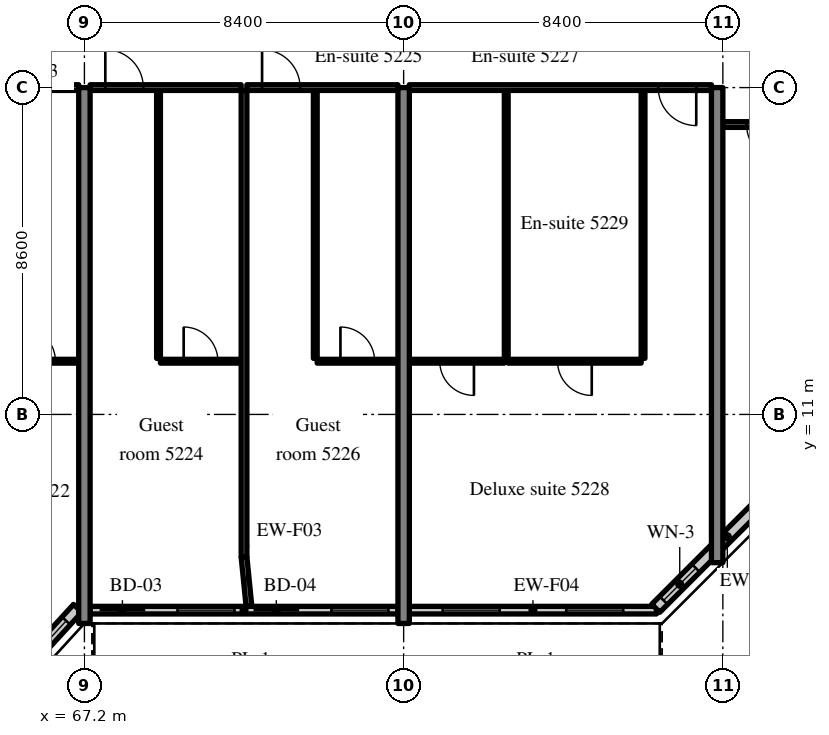
"""IFC4 building model, lengths in metres.
Left out: names, types, materials, properties, quantities, classifications, styles, units other than length and angle.
Written with IfcOpenShell. Run it as: python <this file> out.ifc"""

import sys

from ifc_helpers import new_model, si_unit, direction, frame, frame_2d, origin, place, context, subcontext, project, spatial, rectangle, extrude, source, transform, mapped, element, fill, save


model = new_model("IFC4")
c1 = context("Model", 3, precision=1e-05, world=origin(), true_north=direction((0.0, 1.0)))
c2 = subcontext(c1, "Body", "Model", "MODEL_VIEW")
j1 = project(units=[si_unit("LENGTHUNIT", "METRE"), si_unit("PLANEANGLEUNIT", "RADIAN")], contexts=[c1])
p1 = place(None, origin())
s1 = spatial("IfcSite", under=j1, at=p1, CompositionType="ELEMENT")
p2 = place(p1, origin())
s2 = spatial("IfcBuilding", under=s1, at=p2, CompositionType="ELEMENT")
p3 = place(p2, frame((0.0, 0.0, 217.9)))
s3 = spatial("IfcBuildingStorey", under=s2, at=p3, CompositionType="ELEMENT", Elevation=217.9)
m1 = source(origin(), c2, "Body", "SweptSolid", [
    extrude(rectangle(XDim=14.1, YDim=0.3, at=frame_2d((7.05, 0.0))), origin(), (0.0, 0.0, 1.0), 3.62),
])
for number, where, z_axis, x_axis in (
    (1, (67.2, 5.5, 0.0), (0.0, 0.0, 1.0), (0.0, 1.0, 0.0)),
    (2, (75.6, 5.5, 0.0), (0.0, 0.0, 1.0), (0.0, 1.0, 0.0)),
):
    element("IfcWall", number, at=place(p3, frame(where, z_axis=z_axis, x_axis=x_axis)), inside=s3, PredefinedType="SHEAR", context=c2, shape_type="MappedRepresentation", body=[
        mapped(m1, transform((0.0, 0.0, 0.0), scale=1.0)),
    ])
m2 = source(origin(), c2, "Body", "SweptSolid", [
    extrude(rectangle(XDim=12.5, YDim=0.3, at=frame_2d((6.25, 0.0))), origin(), (0.0, 0.0, 1.0), 3.62),
])
p4 = place(p3, frame((83.85, 7.1, 0.0), z_axis=(0.0, 0.0, 1.0), x_axis=(0.0, 1.0, 0.0)))
e3 = element("IfcWall", 3, at=p4, inside=s3, PredefinedType="SHEAR", context=c2, shape_type="MappedRepresentation", body=[
    mapped(m2, transform((0.0, 0.0, 0.0), scale=1.0)),
])
m3 = source(origin(), c2, "Body", "SweptSolid", [
    extrude(rectangle(XDim=2.398, YDim=0.3, at=frame_2d((1.199, 0.0))), origin(), (0.0, 0.0, 1.0), 3.62),
])
p5 = place(p3, frame((65.404, 4.131, 0.0), z_axis=(0.0, 0.0, 1.0), x_axis=(0.675374189419, 0.737475222815, 0.0)))
e4 = element("IfcWall", 4, at=p5, inside=s3, PredefinedType="SOLIDWALL", context=c2, shape_type="MappedRepresentation", body=[
    mapped(m3, transform((0.0, 0.0, 0.0), scale=1.0)),
])
m4 = source(origin(), c2, "Body", "SweptSolid", [
    extrude(rectangle(XDim=1.5, YDim=2.0, at=frame_2d((0.75, 1.0))), frame((0.0, 0.16, 0.0), z_axis=(0.0, -1.0, 0.0), x_axis=(1.0, 0.0, 0.0)), (0.0, 0.0, 1.0), 0.32),
])
p6 = place(p5, frame((0.449, 0.0, 0.9)))
e5 = element("IfcOpeningElement", 5, at=p6, cuts=e4, PredefinedType="OPENING", context=c2, shape_type="MappedRepresentation", body=[
    mapped(m4, transform((0.0, 0.0, 0.0), scale=1.0)),
])
m5 = source(origin(), c2, "Body", "SweptSolid", [
    extrude(rectangle(XDim=8.1, YDim=0.2, at=frame_2d((4.05, 0.0))), origin(), (0.0, 0.0, 1.0), 3.02),
])
p7 = place(p3, frame((67.35, 5.85, 0.0), z_axis=(0.0, 0.0, 1.0), x_axis=(1.0, 0.0, 0.0)))
e6 = element("IfcWall", 6, at=p7, inside=s3, PredefinedType="SOLIDWALL", context=c2, shape_type="MappedRepresentation", body=[
    mapped(m5, transform((0.0, 0.0, 0.0), scale=1.0)),
])
m6 = source(origin(), c2, "Body", "SweptSolid", [
    extrude(rectangle(XDim=1.2, YDim=2.4, at=frame_2d((0.6, 1.2))), frame((0.0, 0.11, 0.0), z_axis=(0.0, -1.0, 0.0), x_axis=(1.0, 0.0, 0.0)), (0.0, 0.0, 1.0), 0.22),
])
p8 = place(p7, frame((0.25, 0.0, 0.0)))
e7 = element("IfcOpeningElement", 7, at=p8, cuts=e6, PredefinedType="OPENING", context=c2, shape_type="MappedRepresentation", body=[
    mapped(m6, transform((0.0, 0.0, 0.0), scale=1.0)),
])
m7 = source(origin(), c2, "Body", "SweptSolid", [
    extrude(rectangle(XDim=1.5, YDim=1.5, at=frame_2d((0.75, 0.75))), frame((0.0, 0.11, 0.0), z_axis=(0.0, -1.0, 0.0), x_axis=(1.0, 0.0, 0.0)), (0.0, 0.0, 1.0), 0.22),
])
p9 = place(p7, frame((2.3, 0.0, 0.9)))
e8 = element("IfcOpeningElement", 8, at=p9, cuts=e6, PredefinedType="OPENING", context=c2, shape_type="MappedRepresentation", body=[
    mapped(m7, transform((0.0, 0.0, 0.0), scale=1.0)),
])
p10 = place(p7, frame((4.3, 0.0, 0.0)))
e9 = element("IfcOpeningElement", 9, at=p10, cuts=e6, PredefinedType="OPENING", context=c2, shape_type="MappedRepresentation", body=[
    mapped(m6, transform((0.0, 0.0, 0.0), scale=1.0)),
])
p11 = place(p7, frame((6.35, 0.0, 0.9)))
e10 = element("IfcOpeningElement", 10, at=p11, cuts=e6, PredefinedType="OPENING", context=c2, shape_type="MappedRepresentation", body=[
    mapped(m7, transform((0.0, 0.0, 0.0), scale=1.0)),
])
m8 = source(origin(), c2, "Body", "SweptSolid", [
    extrude(rectangle(XDim=6.505, YDim=0.2, at=frame_2d((3.252, 0.0))), origin(), (0.0, 0.0, 1.0), 3.02),
])
p12 = place(p3, frame((75.75, 5.85, 0.0), z_axis=(0.0, 0.0, 1.0), x_axis=(1.0, 0.0, 0.0)))
e11 = element("IfcWall", 11, at=p12, inside=s3, PredefinedType="SOLIDWALL", context=c2, shape_type="MappedRepresentation", body=[
    mapped(m8, transform((0.0, 0.0, 0.0), scale=1.0)),
])
p13 = place(p12, frame((0.876, 0.0, 0.9)))
e12 = element("IfcOpeningElement", 12, at=p13, cuts=e11, PredefinedType="OPENING", context=c2, shape_type="MappedRepresentation", body=[
    mapped(m7, transform((0.0, 0.0, 0.0), scale=1.0)),
])
p14 = place(p12, frame((4.129, 0.0, 0.9)))
e13 = element("IfcOpeningElement", 13, at=p14, cuts=e11, PredefinedType="OPENING", context=c2, shape_type="MappedRepresentation", body=[
    mapped(m7, transform((0.0, 0.0, 0.0), scale=1.0)),
])
m9 = source(origin(), c2, "Body", "SweptSolid", [
    extrude(rectangle(XDim=5.326, YDim=0.3, at=frame_2d((2.663, 0.0))), origin(), (0.0, 0.0, 1.0), 3.62),
])
p15 = place(p3, frame((82.234, 5.9, 0.0), z_axis=(0.0, 0.0, 1.0), x_axis=(0.707083859269, 0.707129702361, 0.0)))
e14 = element("IfcWall", 14, at=p15, inside=s3, PredefinedType="SOLIDWALL", context=c2, shape_type="MappedRepresentation", body=[
    mapped(m9, transform((0.0, 0.0, 0.0), scale=1.0)),
])
m10 = source(origin(), c2, "Body", "SweptSolid", [
    extrude(rectangle(XDim=1.2, YDim=1.5, at=frame_2d((0.6, 0.75))), frame((0.0, 0.16, 0.0), z_axis=(0.0, -1.0, 0.0), x_axis=(1.0, 0.0, 0.0)), (0.0, 0.0, 1.0), 0.32),
])
p16 = place(p15, frame((0.292, 0.0, 0.9)))
e15 = element("IfcOpeningElement", 15, at=p16, cuts=e14, PredefinedType="OPENING", context=c2, shape_type="MappedRepresentation", body=[
    mapped(m10, transform((0.0, 0.0, 0.0), scale=1.0)),
])
m11 = source(origin(), c2, "Body", "SweptSolid", [
    extrude(rectangle(XDim=2.125, YDim=0.1, at=frame_2d((1.062, 0.0))), origin(), (0.0, 0.0, 1.0), 3.62),
])
p17 = place(p3, frame((64.925, 12.4, 0.0), z_axis=(0.0, 0.0, 1.0), x_axis=(1.0, 0.0, 0.0)))
e16 = element("IfcWall", 16, at=p17, inside=s3, PredefinedType="PARTITIONING", context=c2, shape_type="MappedRepresentation", body=[
    mapped(m11, transform((0.0, 0.0, 0.0), scale=1.0)),
])
m12 = source(origin(), c2, "Body", "SweptSolid", [
    extrude(rectangle(XDim=0.9, YDim=2.1, at=frame_2d((0.45, 1.05))), frame((0.0, 0.06, 0.0), z_axis=(0.0, -1.0, 0.0), x_axis=(1.0, 0.0, 0.0)), (0.0, 0.0, 1.0), 0.12),
])
p18 = place(p17, frame((0.612, 0.0, 0.0)))
e17 = element("IfcOpeningElement", 17, at=p18, cuts=e16, PredefinedType="OPENING", context=c2, shape_type="MappedRepresentation", body=[
    mapped(m12, transform((0.0, 0.0, 0.0), scale=1.0)),
])
m13 = source(origin(), c2, "Body", "SweptSolid", [
    extrude(rectangle(XDim=3.975, YDim=0.15, at=frame_2d((1.988, 0.0))), origin(), (0.0, 0.0, 1.0), 2.92),
])
p19 = place(p3, frame((63.075, 19.6, 0.0), z_axis=(0.0, 0.0, 1.0), x_axis=(1.0, 0.0, 0.0)))
e18 = element("IfcWall", 18, at=p19, inside=s3, PredefinedType="PARTITIONING", context=c2, shape_type="MappedRepresentation", body=[
    mapped(m13, transform((0.0, 0.0, 0.0), scale=1.0)),
])
m14 = source(origin(), c2, "Body", "SweptSolid", [
    extrude(rectangle(XDim=1.0, YDim=2.1, at=frame_2d((0.5, 1.05))), frame((0.0, 0.085, 0.0), z_axis=(0.0, -1.0, 0.0), x_axis=(1.0, 0.0, 0.0)), (0.0, 0.0, 1.0), 0.17),
])
p20 = place(p19, frame((0.4, 0.0, 0.0)))
e19 = element("IfcOpeningElement", 19, at=p20, cuts=e18, PredefinedType="OPENING", context=c2, shape_type="MappedRepresentation", body=[
    mapped(m14, transform((0.0, 0.0, 0.0), scale=1.0)),
])
m15 = source(origin(), c2, "Body", "SweptSolid", [
    extrude(rectangle(XDim=7.05, YDim=0.1, at=frame_2d((3.525, 0.0))), origin(), (0.0, 0.0, 1.0), 3.62),
])
p21 = place(p3, frame((69.15, 12.475, 0.0), z_axis=(0.0, 0.0, 1.0), x_axis=(0.0, 1.0, 0.0)))
e20 = element("IfcWall", 20, at=p21, inside=s3, PredefinedType="PARTITIONING", context=c2, shape_type="MappedRepresentation", body=[
    mapped(m15, transform((0.0, 0.0, 0.0), scale=1.0)),
])
p22 = place(p3, frame((69.2, 12.4, 0.0), z_axis=(0.0, 0.0, 1.0), x_axis=(1.0, 0.0, 0.0)))
e21 = element("IfcWall", 21, at=p22, inside=s3, PredefinedType="PARTITIONING", context=c2, shape_type="MappedRepresentation", body=[
    mapped(m11, transform((0.0, 0.0, 0.0), scale=1.0)),
])
p23 = place(p22, frame((0.612, 0.0, 0.0)))
e22 = element("IfcOpeningElement", 22, at=p23, cuts=e21, PredefinedType="OPENING", context=c2, shape_type="MappedRepresentation", body=[
    mapped(m12, transform((0.0, 0.0, 0.0), scale=1.0)),
])
m16 = source(origin(), c2, "Body", "SweptSolid", [
    extrude(rectangle(XDim=3.975, YDim=0.15, at=frame_2d((1.987, 0.0))), origin(), (0.0, 0.0, 1.0), 2.92),
])
p24 = place(p3, frame((67.35, 19.6, 0.0), z_axis=(0.0, 0.0, 1.0), x_axis=(1.0, 0.0, 0.0)))
e23 = element("IfcWall", 23, at=p24, inside=s3, PredefinedType="PARTITIONING", context=c2, shape_type="MappedRepresentation", body=[
    mapped(m16, transform((0.0, 0.0, 0.0), scale=1.0)),
])
p25 = place(p24, frame((0.4, 0.0, 0.0)))
e24 = element("IfcOpeningElement", 24, at=p25, cuts=e23, PredefinedType="OPENING", context=c2, shape_type="MappedRepresentation", body=[
    mapped(m14, transform((0.0, 0.0, 0.0), scale=1.0)),
])
p26 = place(p3, frame((73.275, 12.475, 0.0), z_axis=(0.0, 0.0, 1.0), x_axis=(0.0, 1.0, 0.0)))
e25 = element("IfcWall", 25, at=p26, inside=s3, PredefinedType="PARTITIONING", context=c2, shape_type="MappedRepresentation", body=[
    mapped(m15, transform((0.0, 0.0, 0.0), scale=1.0)),
])
p27 = place(p3, frame((73.325, 12.4, 0.0), z_axis=(0.0, 0.0, 1.0), x_axis=(1.0, 0.0, 0.0)))
e26 = element("IfcWall", 26, at=p27, inside=s3, PredefinedType="PARTITIONING", context=c2, shape_type="MappedRepresentation", body=[
    mapped(m11, transform((0.0, 0.0, 0.0), scale=1.0)),
])
p28 = place(p27, frame((0.612, 0.0, 0.0)))
e27 = element("IfcOpeningElement", 27, at=p28, cuts=e26, PredefinedType="OPENING", context=c2, shape_type="MappedRepresentation", body=[
    mapped(m12, transform((0.0, 0.0, 0.0), scale=1.0)),
])
p29 = place(p3, frame((71.475, 19.6, 0.0), z_axis=(0.0, 0.0, 1.0), x_axis=(1.0, 0.0, 0.0)))
e28 = element("IfcWall", 28, at=p29, inside=s3, PredefinedType="PARTITIONING", context=c2, shape_type="MappedRepresentation", body=[
    mapped(m16, transform((0.0, 0.0, 0.0), scale=1.0)),
])
p30 = place(p29, frame((0.4, 0.0, 0.0)))
e29 = element("IfcOpeningElement", 29, at=p30, cuts=e28, PredefinedType="OPENING", context=c2, shape_type="MappedRepresentation", body=[
    mapped(m14, transform((0.0, 0.0, 0.0), scale=1.0)),
])
m17 = source(origin(), c2, "Body", "SweptSolid", [
    extrude(rectangle(XDim=12.275, YDim=0.15, at=frame_2d((6.137, 0.0))), origin(), (0.0, 0.0, 1.0), 3.62),
])
p31 = place(p3, frame((71.4, 7.25, 0.0), z_axis=(0.0, 0.0, 1.0), x_axis=(0.0, 1.0, 0.0)))
e30 = element("IfcWall", 30, at=p31, inside=s3, PredefinedType="PARTITIONING", context=c2, shape_type="MappedRepresentation", body=[
    mapped(m17, transform((0.0, 0.0, 0.0), scale=1.0)),
])
for number, where, z_axis, x_axis in (
    (31, (81.9, 12.475, 0.0), (0.0, 0.0, 1.0), (0.0, 1.0, 0.0)),
    (32, (78.3, 12.475, 0.0), (0.0, 0.0, 1.0), (0.0, 1.0, 0.0)),
):
    element("IfcWall", number, at=place(p3, frame(where, z_axis=z_axis, x_axis=x_axis)), inside=s3, PredefinedType="PARTITIONING", context=c2, shape_type="MappedRepresentation", body=[
        mapped(m15, transform((0.0, 0.0, 0.0), scale=1.0)),
    ])
m18 = source(origin(), c2, "Body", "SweptSolid", [
    extrude(rectangle(XDim=3.5, YDim=0.1, at=frame_2d((1.75, 0.0))), origin(), (0.0, 0.0, 1.0), 3.62),
])
p32 = place(p3, frame((78.35, 12.4, 0.0), z_axis=(0.0, 0.0, 1.0), x_axis=(1.0, 0.0, 0.0)))
e33 = element("IfcWall", 33, at=p32, inside=s3, PredefinedType="PARTITIONING", context=c2, shape_type="MappedRepresentation", body=[
    mapped(m18, transform((0.0, 0.0, 0.0), scale=1.0)),
])
p33 = place(p32, frame((1.3, 0.0, 0.0)))
e34 = element("IfcOpeningElement", 34, at=p33, cuts=e33, PredefinedType="OPENING", context=c2, shape_type="MappedRepresentation", body=[
    mapped(m12, transform((0.0, 0.0, 0.0), scale=1.0)),
])
m19 = source(origin(), c2, "Body", "SweptSolid", [
    extrude(rectangle(XDim=2.5, YDim=0.1, at=frame_2d((1.25, 0.0))), origin(), (0.0, 0.0, 1.0), 3.62),
])
p34 = place(p3, frame((75.75, 12.4, 0.0), z_axis=(0.0, 0.0, 1.0), x_axis=(1.0, 0.0, 0.0)))
e35 = element("IfcWall", 35, at=p34, inside=s3, PredefinedType="PARTITIONING", context=c2, shape_type="MappedRepresentation", body=[
    mapped(m19, transform((0.0, 0.0, 0.0), scale=1.0)),
])
p35 = place(p34, frame((0.8, 0.0, 0.0)))
e36 = element("IfcOpeningElement", 36, at=p35, cuts=e35, PredefinedType="OPENING", context=c2, shape_type="MappedRepresentation", body=[
    mapped(m12, transform((0.0, 0.0, 0.0), scale=1.0)),
])
m20 = source(origin(), c2, "Body", "SweptSolid", [
    extrude(rectangle(XDim=7.95, YDim=0.15, at=frame_2d((3.975, 0.0))), origin(), (0.0, 0.0, 1.0), 2.92),
])
p36 = place(p3, frame((75.75, 19.6, 0.0), z_axis=(0.0, 0.0, 1.0), x_axis=(1.0, 0.0, 0.0)))
e37 = element("IfcWall", 37, at=p36, inside=s3, PredefinedType="PARTITIONING", context=c2, shape_type="MappedRepresentation", body=[
    mapped(m20, transform((0.0, 0.0, 0.0), scale=1.0)),
])
p37 = place(p36, frame((6.55, 0.0, 0.0)))
e38 = element("IfcOpeningElement", 38, at=p37, cuts=e37, PredefinedType="OPENING", context=c2, shape_type="MappedRepresentation", body=[
    mapped(m14, transform((0.0, 0.0, 0.0), scale=1.0)),
])
m21 = source(origin(), c2, "Body", "SweptSolid", [
    extrude(rectangle(XDim=1.9, YDim=0.15, at=frame_2d((0.95, 0.0))), origin(), (0.0, 0.0, 1.0), 2.92),
])
p38 = place(p3, frame((84.0, 18.628, 0.0), z_axis=(0.0, 0.0, 1.0), x_axis=(1.0, 0.0, 0.0)))
e39 = element("IfcWall", 39, at=p38, inside=s3, PredefinedType="PARTITIONING", context=c2, shape_type="MappedRepresentation", body=[
    mapped(m21, transform((0.0, 0.0, 0.0), scale=1.0)),
])
p39 = place(p38, frame((0.625, 0.0, 0.0)))
e40 = element("IfcOpeningElement", 40, at=p39, cuts=e39, PredefinedType="OPENING", context=c2, shape_type="MappedRepresentation", body=[
    mapped(m14, transform((0.0, 0.0, 0.0), scale=1.0)),
])
m22 = source(origin(), c2, "Body", "SweptSolid", [
    extrude(rectangle(XDim=1.307, YDim=0.15, at=frame_2d((0.653, 0.0))), origin(), (0.0, 0.0, 1.0), 3.62),
])
p40 = place(p3, frame((71.53, 5.95, 0.0), z_axis=(0.0, 0.0, 1.0), x_axis=(-0.099596223396, 0.99502793543, 0.0)))
e41 = element("IfcWall", 41, at=p40, inside=s3, PredefinedType="PARTITIONING", context=c2, shape_type="MappedRepresentation", body=[
    mapped(m22, transform((0.0, 0.0, 0.0), scale=1.0)),
])
m23 = source(origin(), c2, "Body", "SweptSolid", [
    extrude(rectangle(XDim=1.5, YDim=2.0, at=frame_2d((0.75, 1.0))), frame((0.0, 0.03, 0.0), z_axis=(0.0, -1.0, 0.0), x_axis=(1.0, 0.0, 0.0)), (0.0, 0.0, 1.0), 0.06),
])
p41 = place(p6, origin())
e42 = element("IfcWindow", 42, at=p41, inside=s3, PartitioningType="SINGLE_PANEL", PredefinedType="WINDOW", context=c2, shape_type="MappedRepresentation", body=[
    mapped(m23, transform((0.0, 0.0, 0.0), scale=1.0)),
])
fill(e5, e42)
m24 = source(origin(), c2, "Body", "SweptSolid", [
    extrude(rectangle(XDim=1.2, YDim=2.4, at=frame_2d((0.6, 1.2))), frame((0.0, 0.025, 0.0), z_axis=(0.0, -1.0, 0.0), x_axis=(1.0, 0.0, 0.0)), (0.0, 0.0, 1.0), 0.05),
])
p42 = place(p8, origin())
e43 = element("IfcDoor", 43, at=p42, inside=s3, OperationType="SLIDING_TO_LEFT", PredefinedType="DOOR", context=c2, shape_type="MappedRepresentation", body=[
    mapped(m24, transform((0.0, 0.0, 0.0), scale=1.0)),
])
fill(e7, e43)
m25 = source(origin(), c2, "Body", "SweptSolid", [
    extrude(rectangle(XDim=1.5, YDim=1.5, at=frame_2d((0.75, 0.75))), frame((0.0, 0.03, 0.0), z_axis=(0.0, -1.0, 0.0), x_axis=(1.0, 0.0, 0.0)), (0.0, 0.0, 1.0), 0.06),
])
p43 = place(p9, origin())
e44 = element("IfcWindow", 44, at=p43, inside=s3, PartitioningType="SINGLE_PANEL", PredefinedType="WINDOW", context=c2, shape_type="MappedRepresentation", body=[
    mapped(m25, transform((0.0, 0.0, 0.0), scale=1.0)),
])
fill(e8, e44)
p44 = place(p10, origin())
e45 = element("IfcDoor", 45, at=p44, inside=s3, OperationType="SLIDING_TO_RIGHT", PredefinedType="DOOR", context=c2, shape_type="MappedRepresentation", body=[
    mapped(m24, transform((0.0, 0.0, 0.0), scale=1.0)),
])
fill(e9, e45)
p45 = place(p11, origin())
e46 = element("IfcWindow", 46, at=p45, inside=s3, PartitioningType="SINGLE_PANEL", PredefinedType="WINDOW", context=c2, shape_type="MappedRepresentation", body=[
    mapped(m25, transform((0.0, 0.0, 0.0), scale=1.0)),
])
fill(e10, e46)
p46 = place(p13, origin())
e47 = element("IfcWindow", 47, at=p46, inside=s3, PartitioningType="SINGLE_PANEL", PredefinedType="WINDOW", context=c2, shape_type="MappedRepresentation", body=[
    mapped(m25, transform((0.0, 0.0, 0.0), scale=1.0)),
])
fill(e12, e47)
p47 = place(p14, origin())
e48 = element("IfcWindow", 48, at=p47, inside=s3, PartitioningType="SINGLE_PANEL", PredefinedType="WINDOW", context=c2, shape_type="MappedRepresentation", body=[
    mapped(m25, transform((0.0, 0.0, 0.0), scale=1.0)),
])
fill(e13, e48)
m26 = source(origin(), c2, "Body", "SweptSolid", [
    extrude(rectangle(XDim=1.2, YDim=1.5, at=frame_2d((0.6, 0.75))), frame((0.0, 0.03, 0.0), z_axis=(0.0, -1.0, 0.0), x_axis=(1.0, 0.0, 0.0)), (0.0, 0.0, 1.0), 0.06),
])
p48 = place(p16, origin())
e49 = element("IfcWindow", 49, at=p48, inside=s3, PartitioningType="SINGLE_PANEL", PredefinedType="WINDOW", context=c2, shape_type="MappedRepresentation", body=[
    mapped(m26, transform((0.0, 0.0, 0.0), scale=1.0)),
])
fill(e15, e49)
m27 = source(origin(), c2, "Body", "SweptSolid", [
    extrude(rectangle(XDim=0.9, YDim=2.1, at=frame_2d((0.45, 1.05))), frame((0.0, 0.025, 0.0), z_axis=(0.0, -1.0, 0.0), x_axis=(1.0, 0.0, 0.0)), (0.0, 0.0, 1.0), 0.05),
])
p49 = place(p18, origin())
e50 = element("IfcDoor", 50, at=p49, inside=s3, OperationType="SINGLE_SWING_LEFT", PredefinedType="DOOR", context=c2, shape_type="MappedRepresentation", body=[
    mapped(m27, transform((0.0, 0.0, 0.0), scale=1.0)),
])
fill(e17, e50)
p50 = place(p23, origin())
e51 = element("IfcDoor", 51, at=p50, inside=s3, OperationType="SINGLE_SWING_LEFT", PredefinedType="DOOR", context=c2, shape_type="MappedRepresentation", body=[
    mapped(m27, transform((0.0, 0.0, 0.0), scale=1.0)),
])
fill(e22, e51)
m28 = source(origin(), c2, "Body", "SweptSolid", [
    extrude(rectangle(XDim=1.0, YDim=2.1, at=frame_2d((0.5, 1.05))), frame((0.0, 0.025, 0.0), z_axis=(0.0, -1.0, 0.0), x_axis=(1.0, 0.0, 0.0)), (0.0, 0.0, 1.0), 0.05),
])
p51 = place(p25, origin())
e52 = element("IfcDoor", 52, at=p51, inside=s3, OperationType="SINGLE_SWING_LEFT", PredefinedType="DOOR", context=c2, shape_type="MappedRepresentation", body=[
    mapped(m28, transform((0.0, 0.0, 0.0), scale=1.0)),
])
fill(e24, e52)
p52 = place(p28, origin())
e53 = element("IfcDoor", 53, at=p52, inside=s3, OperationType="SINGLE_SWING_LEFT", PredefinedType="DOOR", context=c2, shape_type="MappedRepresentation", body=[
    mapped(m27, transform((0.0, 0.0, 0.0), scale=1.0)),
])
fill(e27, e53)
p53 = place(p30, origin())
e54 = element("IfcDoor", 54, at=p53, inside=s3, OperationType="SINGLE_SWING_LEFT", PredefinedType="DOOR", context=c2, shape_type="MappedRepresentation", body=[
    mapped(m28, transform((0.0, 0.0, 0.0), scale=1.0)),
])
fill(e29, e54)
p54 = place(p33, origin())
e55 = element("IfcDoor", 55, at=p54, inside=s3, OperationType="SINGLE_SWING_RIGHT", PredefinedType="DOOR", context=c2, shape_type="MappedRepresentation", body=[
    mapped(m27, transform((0.0, 0.0, 0.0), scale=1.0)),
])
fill(e34, e55)
p55 = place(p35, origin())
e56 = element("IfcDoor", 56, at=p55, inside=s3, OperationType="SINGLE_SWING_RIGHT", PredefinedType="DOOR", context=c2, shape_type="MappedRepresentation", body=[
    mapped(m27, transform((0.0, 0.0, 0.0), scale=1.0)),
])
fill(e36, e56)
p56 = place(p37, origin())
e57 = element("IfcDoor", 57, at=p56, inside=s3, OperationType="SINGLE_SWING_RIGHT", PredefinedType="DOOR", context=c2, shape_type="MappedRepresentation", body=[
    mapped(m28, transform((0.0, 0.0, 0.0), scale=1.0)),
])
fill(e38, e57)
p57 = place(p39, origin())
e58 = element("IfcDoor", 58, at=p57, inside=s3, OperationType="SINGLE_SWING_RIGHT", PredefinedType="DOOR", context=c2, shape_type="MappedRepresentation", body=[
    mapped(m28, transform((0.0, 0.0, 0.0), scale=1.0)),
])
fill(e40, e58)
save(model, sys.argv[1])
